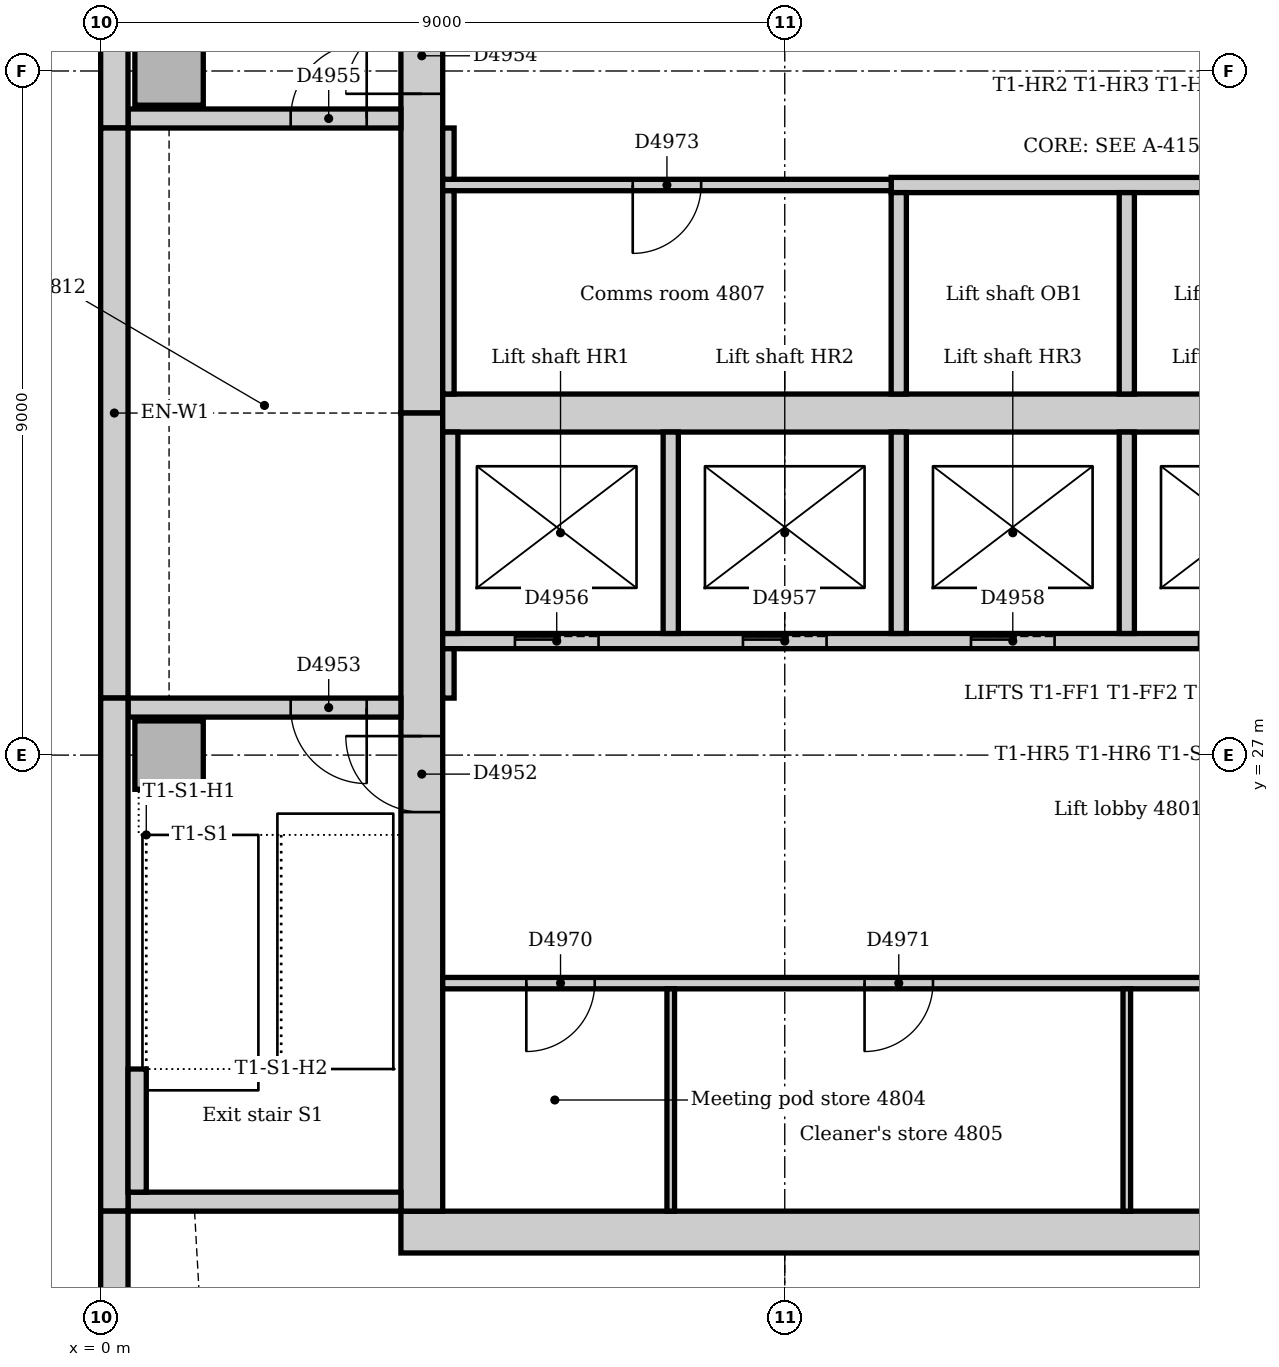
"""IFC4 building model, lengths in metres.
Left out: names, types, materials, properties, quantities, classifications, styles, units other than length and angle.
Written with IfcOpenShell. Run it as: python <this file> out.ifc"""

import sys

from ifc_helpers import new_model, si_unit, direction, frame, frame_2d, origin, origin_2d, place, context, subcontext, project, spatial, rectangle, extrude, element, fill, save


model = new_model("IFC4")
c1 = context("Model", 3, precision=1e-05, world=origin(), true_north=direction((0.0, 1.0)))
c2 = subcontext(c1, "Body", "Model", "MODEL_VIEW")
j1 = project(units=[si_unit("LENGTHUNIT", "METRE"), si_unit("PLANEANGLEUNIT", "RADIAN")], contexts=[c1])
p1 = place(None, origin())
s1 = spatial("IfcSite", under=j1, at=p1, CompositionType="ELEMENT")
p2 = place(p1, origin())
s2 = spatial("IfcBuilding", under=s1, at=p2, CompositionType="ELEMENT")
p3 = place(p2, frame((0.0, 0.0, 202.0)))
s3 = spatial("IfcBuildingStorey", under=s2, at=p3, CompositionType="ELEMENT", Elevation=202.0)
p4 = place(p3, frame((3.95, 20.725, 0.0), z_axis=(0.0, 0.0, 1.0), x_axis=(1.0, 0.0, 0.0)))
e1 = element("IfcWall", 1, at=p4, inside=s3, PredefinedType="SOLIDWALL", context=c2, shape_type="SweptSolid", body=[
    extrude(rectangle(XDim=19.1, YDim=0.55, at=frame_2d((9.55, 0.0))), origin(), (0.0, 0.0, 1.0), 4.0),
])
p5 = place(p3, frame((4.225, 42.0, 0.0), z_axis=(0.0, 0.0, 1.0), x_axis=(0.0, -1.0, 0.0)))
e2 = element("IfcWall", 2, at=p5, inside=s3, PredefinedType="SOLIDWALL", context=c2, shape_type="SweptSolid", body=[
    extrude(rectangle(XDim=10.5, YDim=0.55, at=frame_2d((5.25, 0.0))), origin(), (0.0, 0.0, 1.0), 4.0),
])
p6 = place(p5, frame((5.3, 0.0, 0.0)))
e3 = element("IfcOpeningElement", 3, at=p6, cuts=e2, PredefinedType="OPENING", context=c2, shape_type="SweptSolid", body=[
    extrude(rectangle(XDim=1.0, YDim=2.1, at=frame_2d((0.5, 1.05))), frame((0.0, 0.285, 0.0), z_axis=(0.0, -1.0, 0.0), x_axis=(1.0, 0.0, 0.0)), (0.0, 0.0, 1.0), 0.57),
])
p7 = place(p3, frame((4.225, 31.5, 0.0), z_axis=(0.0, 0.0, 1.0), x_axis=(0.0, -1.0, 0.0)))
e4 = element("IfcWall", 4, at=p7, inside=s3, PredefinedType="SOLIDWALL", context=c2, shape_type="SweptSolid", body=[
    extrude(rectangle(XDim=10.5, YDim=0.55, at=frame_2d((5.25, 0.0))), origin(), (0.0, 0.0, 1.0), 4.0),
])
p8 = place(p7, frame((4.25, 0.0, 0.0)))
e5 = element("IfcOpeningElement", 5, at=p8, cuts=e4, PredefinedType="OPENING", context=c2, shape_type="SweptSolid", body=[
    extrude(rectangle(XDim=1.0, YDim=2.1, at=frame_2d((0.5, 1.05))), frame((0.0, 0.285, 0.0), z_axis=(0.0, -1.0, 0.0), x_axis=(1.0, 0.0, 0.0)), (0.0, 0.0, 1.0), 0.57),
])
p9 = place(p3, frame((4.5, 31.5, 0.0), z_axis=(0.0, 0.0, 1.0), x_axis=(1.0, 0.0, 0.0)))
e6 = element("IfcWall", 6, at=p9, inside=s3, PredefinedType="SOLIDWALL", context=c2, shape_type="SweptSolid", body=[
    extrude(rectangle(XDim=18.0, YDim=0.5, at=frame_2d((9.0, 0.0))), origin(), (0.0, 0.0, 1.0), 4.0),
])
p10 = place(p3, frame((0.36, 21.125, 0.0), z_axis=(0.0, 0.0, 1.0), x_axis=(1.0, 0.0, 0.0)))
e7 = element("IfcWall", 7, at=p10, inside=s3, PredefinedType="SOLIDWALL", context=c2, shape_type="SweptSolid", body=[
    extrude(rectangle(XDim=3.59, YDim=0.25, at=frame_2d((1.795, 0.0))), origin(), (0.0, 0.0, 1.0), 4.0),
])
p11 = place(p3, frame((3.95, 27.625, 0.0), z_axis=(0.0, 0.0, 1.0), x_axis=(-1.0, 0.0, 0.0)))
e8 = element("IfcWall", 8, at=p11, inside=s3, PredefinedType="SOLIDWALL", context=c2, shape_type="SweptSolid", body=[
    extrude(rectangle(XDim=3.59, YDim=0.25, at=frame_2d((1.795, 0.0))), origin(), (0.0, 0.0, 1.0), 4.0),
])
p12 = place(p11, frame((0.45, 0.0, 0.0)))
e9 = element("IfcOpeningElement", 9, at=p12, cuts=e8, PredefinedType="OPENING", context=c2, shape_type="SweptSolid", body=[
    extrude(rectangle(XDim=1.0, YDim=2.1, at=frame_2d((0.5, 1.05))), frame((0.0, 0.135, 0.0), z_axis=(0.0, -1.0, 0.0), x_axis=(1.0, 0.0, 0.0)), (0.0, 0.0, 1.0), 0.27),
])
p13 = place(p3, frame((0.36, 35.375, 0.0), z_axis=(0.0, 0.0, 1.0), x_axis=(1.0, 0.0, 0.0)))
e10 = element("IfcWall", 10, at=p13, inside=s3, PredefinedType="SOLIDWALL", context=c2, shape_type="SweptSolid", body=[
    extrude(rectangle(XDim=3.59, YDim=0.25, at=frame_2d((1.795, 0.0))), origin(), (0.0, 0.0, 1.0), 4.0),
])
p14 = place(p13, frame((2.14, 0.0, 0.0)))
e11 = element("IfcOpeningElement", 11, at=p14, cuts=e10, PredefinedType="OPENING", context=c2, shape_type="SweptSolid", body=[
    extrude(rectangle(XDim=1.0, YDim=2.1, at=frame_2d((0.5, 1.05))), frame((0.0, 0.135, 0.0), z_axis=(0.0, -1.0, 0.0), x_axis=(1.0, 0.0, 0.0)), (0.0, 0.0, 1.0), 0.27),
])
for number, where, z_axis, x_axis in (
    (12, (0.9, 27.0, 0.0), (0.0, 0.0, 1.0), (1.0, 0.0, 0.0)),
    (13, (0.9, 36.0, 0.0), (0.0, 0.0, 1.0), (1.0, 0.0, 0.0)),
):
    element("IfcColumn", number, at=place(p3, frame(where, z_axis=z_axis, x_axis=x_axis)), inside=s3, PredefinedType="COLUMN", context=c2, shape_type="SweptSolid", body=[
        extrude(rectangle(XDim=0.9, YDim=0.9, at=origin_2d()), origin(), (0.0, 0.0, 1.0), 4.0),
    ])
p15 = place(p3, frame((0.18, 42.0, 0.0), z_axis=(0.0, 0.0, 1.0), x_axis=(0.0, -1.0, 0.0)))
e14 = element("IfcWall", 14, at=p15, inside=s3, PredefinedType="STANDARD", context=c2, shape_type="SweptSolid", body=[
    extrude(rectangle(XDim=6.75, YDim=0.36, at=frame_2d((3.375, 0.0))), origin(), (0.0, 0.0, 1.0), 3.85),
])
p16 = place(p3, frame((0.18, 35.25, 0.0), z_axis=(0.0, 0.0, 1.0), x_axis=(0.0, -1.0, 0.0)))
e15 = element("IfcWall", 15, at=p16, inside=s3, PredefinedType="STANDARD", context=c2, shape_type="SweptSolid", body=[
    extrude(rectangle(XDim=7.5, YDim=0.36, at=frame_2d((3.75, 0.0))), origin(), (0.0, 0.0, 1.0), 3.85),
])
p17 = place(p3, frame((0.18, 27.75, 0.0), z_axis=(0.0, 0.0, 1.0), x_axis=(0.0, -1.0, 0.0)))
e16 = element("IfcWall", 16, at=p17, inside=s3, PredefinedType="STANDARD", context=c2, shape_type="SweptSolid", body=[
    extrude(rectangle(XDim=6.75, YDim=0.36, at=frame_2d((3.375, 0.0))), origin(), (0.0, 0.0, 1.0), 3.85),
])
p18 = place(p3, frame((0.18, 21.0, 0.0), z_axis=(0.0, 0.0, 1.0), x_axis=(0.0, -1.0, 0.0)))
e17 = element("IfcWall", 17, at=p18, inside=s3, PredefinedType="STANDARD", context=c2, shape_type="SweptSolid", body=[
    extrude(rectangle(XDim=3.257, YDim=0.36, at=frame_2d((1.629, 0.0))), origin(), (0.0, 0.0, 1.0), 3.85),
])
p19 = place(p3, frame((0.48, 21.25, 0.0), z_axis=(0.0, 0.0, 1.0), x_axis=(0.0, 1.0, 0.0)))
e18 = element("IfcWall", 18, at=p19, inside=s3, PredefinedType="STANDARD", context=c2, shape_type="SweptSolid", body=[
    extrude(rectangle(XDim=1.62, YDim=0.24, at=frame_2d((0.81, 0.0))), origin(), (0.0, 0.0, 1.0), 4.0),
])
p20 = place(p3, frame((4.5, 28.5, 0.0), z_axis=(0.0, 0.0, 1.0), x_axis=(1.0, 0.0, 0.0)))
e19 = element("IfcWall", 19, at=p20, inside=s3, PredefinedType="PARTITIONING", context=c2, shape_type="SweptSolid", body=[
    extrude(rectangle(XDim=18.0, YDim=0.2, at=frame_2d((9.0, 0.0))), origin(), (0.0, 0.0, 1.0), 3.85),
])
p21 = place(p20, frame((0.95, 0.0, 0.0)))
e20 = element("IfcOpeningElement", 20, at=p21, cuts=e19, PredefinedType="OPENING", context=c2, shape_type="SweptSolid", body=[
    extrude(rectangle(XDim=1.1, YDim=2.1, at=frame_2d((0.55, 1.05))), frame((0.0, 0.11, 0.0), z_axis=(0.0, -1.0, 0.0), x_axis=(1.0, 0.0, 0.0)), (0.0, 0.0, 1.0), 0.22),
])
p22 = place(p20, frame((3.95, 0.0, 0.0)))
e21 = element("IfcOpeningElement", 21, at=p22, cuts=e19, PredefinedType="OPENING", context=c2, shape_type="SweptSolid", body=[
    extrude(rectangle(XDim=1.1, YDim=2.1, at=frame_2d((0.55, 1.05))), frame((0.0, 0.11, 0.0), z_axis=(0.0, -1.0, 0.0), x_axis=(1.0, 0.0, 0.0)), (0.0, 0.0, 1.0), 0.22),
])
p23 = place(p20, frame((6.95, 0.0, 0.0)))
e22 = element("IfcOpeningElement", 22, at=p23, cuts=e19, PredefinedType="OPENING", context=c2, shape_type="SweptSolid", body=[
    extrude(rectangle(XDim=1.1, YDim=2.1, at=frame_2d((0.55, 1.05))), frame((0.0, 0.11, 0.0), z_axis=(0.0, -1.0, 0.0), x_axis=(1.0, 0.0, 0.0)), (0.0, 0.0, 1.0), 0.22),
])
p24 = place(p20, frame((9.95, 0.0, 0.0)))
e23 = element("IfcOpeningElement", 23, at=p24, cuts=e19, PredefinedType="OPENING", context=c2, shape_type="SweptSolid", body=[
    extrude(rectangle(XDim=1.1, YDim=2.1, at=frame_2d((0.55, 1.05))), frame((0.0, 0.11, 0.0), z_axis=(0.0, -1.0, 0.0), x_axis=(1.0, 0.0, 0.0)), (0.0, 0.0, 1.0), 0.22),
])
p25 = place(p20, frame((12.95, 0.0, 0.0)))
e24 = element("IfcOpeningElement", 24, at=p25, cuts=e19, PredefinedType="OPENING", context=c2, shape_type="SweptSolid", body=[
    extrude(rectangle(XDim=1.1, YDim=2.1, at=frame_2d((0.55, 1.05))), frame((0.0, 0.11, 0.0), z_axis=(0.0, -1.0, 0.0), x_axis=(1.0, 0.0, 0.0)), (0.0, 0.0, 1.0), 0.22),
])
p26 = place(p20, frame((15.95, 0.0, 0.0)))
e25 = element("IfcOpeningElement", 25, at=p26, cuts=e19, PredefinedType="OPENING", context=c2, shape_type="SweptSolid", body=[
    extrude(rectangle(XDim=1.1, YDim=2.1, at=frame_2d((0.55, 1.05))), frame((0.0, 0.11, 0.0), z_axis=(0.0, -1.0, 0.0), x_axis=(1.0, 0.0, 0.0)), (0.0, 0.0, 1.0), 0.22),
])
p27 = place(p3, frame((10.4, 34.5, 0.0), z_axis=(0.0, 0.0, 1.0), x_axis=(1.0, 0.0, 0.0)))
e26 = element("IfcWall", 26, at=p27, inside=s3, PredefinedType="PARTITIONING", context=c2, shape_type="SweptSolid", body=[
    extrude(rectangle(XDim=12.1, YDim=0.2, at=frame_2d((6.05, 0.0))), origin(), (0.0, 0.0, 1.0), 3.85),
])
p28 = place(p27, frame((7.05, 0.0, 0.0)))
e27 = element("IfcOpeningElement", 27, at=p28, cuts=e26, PredefinedType="OPENING", context=c2, shape_type="SweptSolid", body=[
    extrude(rectangle(XDim=1.1, YDim=2.1, at=frame_2d((0.55, 1.05))), frame((0.0, 0.11, 0.0), z_axis=(0.0, -1.0, 0.0), x_axis=(1.0, 0.0, 0.0)), (0.0, 0.0, 1.0), 0.22),
])
p29 = place(p27, frame((10.05, 0.0, 0.0)))
e28 = element("IfcOpeningElement", 28, at=p29, cuts=e26, PredefinedType="OPENING", context=c2, shape_type="SweptSolid", body=[
    extrude(rectangle(XDim=1.1, YDim=2.1, at=frame_2d((0.55, 1.05))), frame((0.0, 0.11, 0.0), z_axis=(0.0, -1.0, 0.0), x_axis=(1.0, 0.0, 0.0)), (0.0, 0.0, 1.0), 0.22),
])
for number, where, z_axis, x_axis in (
    (29, (10.5, 28.6, 0.0), (0.0, 0.0, 1.0), (0.0, 1.0, 0.0)),
    (30, (10.5, 31.75, 0.0), (0.0, 0.0, 1.0), (0.0, 1.0, 0.0)),
    (31, (13.5, 28.6, 0.0), (0.0, 0.0, 1.0), (0.0, 1.0, 0.0)),
    (32, (13.5, 31.75, 0.0), (0.0, 0.0, 1.0), (0.0, 1.0, 0.0)),
    (33, (4.6, 28.6, 0.0), (0.0, 0.0, 1.0), (0.0, 1.0, 0.0)),
    (34, (7.5, 28.6, 0.0), (0.0, 0.0, 1.0), (0.0, 1.0, 0.0)),
):
    element("IfcWall", number, at=place(p3, frame(where, z_axis=z_axis, x_axis=x_axis)), inside=s3, PredefinedType="PARTITIONING", context=c2, shape_type="SweptSolid", body=[
        extrude(rectangle(XDim=2.65, YDim=0.2, at=frame_2d((1.325, 0.0))), origin(), (0.0, 0.0, 1.0), 3.85),
    ])
p30 = place(p3, frame((4.5, 24.0, 0.0), z_axis=(0.0, 0.0, 1.0), x_axis=(1.0, 0.0, 0.0)))
e35 = element("IfcWall", 35, at=p30, inside=s3, PredefinedType="PARTITIONING", context=c2, shape_type="SweptSolid", body=[
    extrude(rectangle(XDim=18.0, YDim=0.15, at=frame_2d((9.0, 0.0))), origin(), (0.0, 0.0, 1.0), 3.85),
])
p31 = place(p30, frame((1.1, 0.0, 0.0)))
e36 = element("IfcOpeningElement", 36, at=p31, cuts=e35, PredefinedType="OPENING", context=c2, shape_type="SweptSolid", body=[
    extrude(rectangle(XDim=0.9, YDim=2.1, at=frame_2d((0.45, 1.05))), frame((0.0, 0.085, 0.0), z_axis=(0.0, -1.0, 0.0), x_axis=(1.0, 0.0, 0.0)), (0.0, 0.0, 1.0), 0.17),
])
p32 = place(p30, frame((5.55, 0.0, 0.0)))
e37 = element("IfcOpeningElement", 37, at=p32, cuts=e35, PredefinedType="OPENING", context=c2, shape_type="SweptSolid", body=[
    extrude(rectangle(XDim=0.9, YDim=2.1, at=frame_2d((0.45, 1.05))), frame((0.0, 0.085, 0.0), z_axis=(0.0, -1.0, 0.0), x_axis=(1.0, 0.0, 0.0)), (0.0, 0.0, 1.0), 0.17),
])
p33 = place(p30, frame((12.95, 0.0, 0.0)))
e38 = element("IfcOpeningElement", 38, at=p33, cuts=e35, PredefinedType="OPENING", context=c2, shape_type="SweptSolid", body=[
    extrude(rectangle(XDim=0.9, YDim=2.1, at=frame_2d((0.45, 1.05))), frame((0.0, 0.085, 0.0), z_axis=(0.0, -1.0, 0.0), x_axis=(1.0, 0.0, 0.0)), (0.0, 0.0, 1.0), 0.17),
])
p34 = place(p3, frame((4.5, 34.5, 0.0), z_axis=(0.0, 0.0, 1.0), x_axis=(1.0, 0.0, 0.0)))
e39 = element("IfcWall", 39, at=p34, inside=s3, PredefinedType="PARTITIONING", context=c2, shape_type="SweptSolid", body=[
    extrude(rectangle(XDim=5.9, YDim=0.15, at=frame_2d((2.95, 0.0))), origin(), (0.0, 0.0, 1.0), 3.85),
])
p35 = place(p34, frame((2.5, 0.0, 0.0)))
e40 = element("IfcOpeningElement", 40, at=p35, cuts=e39, PredefinedType="OPENING", context=c2, shape_type="SweptSolid", body=[
    extrude(rectangle(XDim=0.9, YDim=2.1, at=frame_2d((0.45, 1.05))), frame((0.0, 0.085, 0.0), z_axis=(0.0, -1.0, 0.0), x_axis=(1.0, 0.0, 0.0)), (0.0, 0.0, 1.0), 0.17),
])
p36 = place(p3, frame((4.575, 34.575, 0.0), z_axis=(0.0, 0.0, 1.0), x_axis=(0.0, 1.0, 0.0)))
e41 = element("IfcWall", 41, at=p36, inside=s3, PredefinedType="PARTITIONING", context=c2, shape_type="SweptSolid", body=[
    extrude(rectangle(XDim=0.675, YDim=0.15, at=frame_2d((0.338, 0.0))), origin(), (0.0, 0.0, 1.0), 3.85),
])
p37 = place(p3, frame((4.575, 31.75, 0.0), z_axis=(0.0, 0.0, 1.0), x_axis=(0.0, 1.0, 0.0)))
e42 = element("IfcWall", 42, at=p37, inside=s3, PredefinedType="PARTITIONING", context=c2, shape_type="SweptSolid", body=[
    extrude(rectangle(XDim=2.675, YDim=0.15, at=frame_2d((1.337, 0.0))), origin(), (0.0, 0.0, 1.0), 3.85),
])
p38 = place(p3, frame((4.575, 27.75, 0.0), z_axis=(0.0, 0.0, 1.0), x_axis=(0.0, 1.0, 0.0)))
e43 = element("IfcWall", 43, at=p38, inside=s3, PredefinedType="PARTITIONING", context=c2, shape_type="SweptSolid", body=[
    extrude(rectangle(XDim=0.65, YDim=0.15, at=frame_2d((0.325, 0.0))), origin(), (0.0, 0.0, 1.0), 3.85),
])
for number, where, z_axis, x_axis in (
    (44, (7.5, 21.0, 0.0), (0.0, 0.0, 1.0), (0.0, 1.0, 0.0)),
    (45, (13.5, 21.0, 0.0), (0.0, 0.0, 1.0), (0.0, 1.0, 0.0)),
):
    element("IfcWall", number, at=place(p3, frame(where, z_axis=z_axis, x_axis=x_axis)), inside=s3, PredefinedType="PARTITIONING", context=c2, shape_type="SweptSolid", body=[
        extrude(rectangle(XDim=2.925, YDim=0.1, at=frame_2d((1.462, 0.0))), origin(), (0.0, 0.0, 1.0), 3.85),
    ])
p39 = place(p8, frame((1.0, 0.0, 0.0), z_axis=(0.0, 0.0, 1.0), x_axis=(-1.0, 0.0, 0.0)))
e46 = element("IfcDoor", 46, at=p39, inside=s3, OperationType="SINGLE_SWING_RIGHT", PredefinedType="DOOR", context=c2, shape_type="SweptSolid", body=[
    extrude(rectangle(XDim=1.0, YDim=2.1, at=frame_2d((0.5, 1.05))), frame((0.0, 0.025, 0.0), z_axis=(0.0, -1.0, 0.0), x_axis=(1.0, 0.0, 0.0)), (0.0, 0.0, 1.0), 0.05),
])
fill(e5, e46)
p40 = place(p12, origin())
e47 = element("IfcDoor", 47, at=p40, inside=s3, OperationType="SINGLE_SWING_LEFT", PredefinedType="DOOR", context=c2, shape_type="SweptSolid", body=[
    extrude(rectangle(XDim=1.0, YDim=2.1, at=frame_2d((0.5, 1.05))), frame((0.0, 0.025, 0.0), z_axis=(0.0, -1.0, 0.0), x_axis=(1.0, 0.0, 0.0)), (0.0, 0.0, 1.0), 0.05),
])
fill(e9, e47)
p41 = place(p6, frame((1.0, 0.0, 0.0), z_axis=(0.0, 0.0, 1.0), x_axis=(-1.0, 0.0, 0.0)))
e48 = element("IfcDoor", 48, at=p41, inside=s3, OperationType="SINGLE_SWING_LEFT", PredefinedType="DOOR", context=c2, shape_type="SweptSolid", body=[
    extrude(rectangle(XDim=1.0, YDim=2.1, at=frame_2d((0.5, 1.05))), frame((0.0, 0.025, 0.0), z_axis=(0.0, -1.0, 0.0), x_axis=(1.0, 0.0, 0.0)), (0.0, 0.0, 1.0), 0.05),
])
fill(e3, e48)
p42 = place(p14, origin())
e49 = element("IfcDoor", 49, at=p42, inside=s3, OperationType="SINGLE_SWING_RIGHT", PredefinedType="DOOR", context=c2, shape_type="SweptSolid", body=[
    extrude(rectangle(XDim=1.0, YDim=2.1, at=frame_2d((0.5, 1.05))), frame((0.0, 0.025, 0.0), z_axis=(0.0, -1.0, 0.0), x_axis=(1.0, 0.0, 0.0)), (0.0, 0.0, 1.0), 0.05),
])
fill(e11, e49)
p43 = place(p21, origin())
e50 = element("IfcDoor", 50, at=p43, inside=s3, OperationType="SLIDING_TO_LEFT", PredefinedType="DOOR", context=c2, shape_type="SweptSolid", body=[
    extrude(rectangle(XDim=1.1, YDim=2.1, at=frame_2d((0.55, 1.05))), frame((0.0, 0.025, 0.0), z_axis=(0.0, -1.0, 0.0), x_axis=(1.0, 0.0, 0.0)), (0.0, 0.0, 1.0), 0.05),
])
fill(e20, e50)
p44 = place(p22, origin())
e51 = element("IfcDoor", 51, at=p44, inside=s3, OperationType="SLIDING_TO_LEFT", PredefinedType="DOOR", context=c2, shape_type="SweptSolid", body=[
    extrude(rectangle(XDim=1.1, YDim=2.1, at=frame_2d((0.55, 1.05))), frame((0.0, 0.025, 0.0), z_axis=(0.0, -1.0, 0.0), x_axis=(1.0, 0.0, 0.0)), (0.0, 0.0, 1.0), 0.05),
])
fill(e21, e51)
p45 = place(p23, origin())
e52 = element("IfcDoor", 52, at=p45, inside=s3, OperationType="SLIDING_TO_LEFT", PredefinedType="DOOR", context=c2, shape_type="SweptSolid", body=[
    extrude(rectangle(XDim=1.1, YDim=2.1, at=frame_2d((0.55, 1.05))), frame((0.0, 0.025, 0.0), z_axis=(0.0, -1.0, 0.0), x_axis=(1.0, 0.0, 0.0)), (0.0, 0.0, 1.0), 0.05),
])
fill(e22, e52)
p46 = place(p31, frame((0.9, 0.0, 0.0), z_axis=(0.0, 0.0, 1.0), x_axis=(-1.0, 0.0, 0.0)))
e53 = element("IfcDoor", 53, at=p46, inside=s3, OperationType="SINGLE_SWING_RIGHT", PredefinedType="DOOR", context=c2, shape_type="SweptSolid", body=[
    extrude(rectangle(XDim=0.9, YDim=2.1, at=frame_2d((0.45, 1.05))), frame((0.0, 0.025, 0.0), z_axis=(0.0, -1.0, 0.0), x_axis=(1.0, 0.0, 0.0)), (0.0, 0.0, 1.0), 0.05),
])
fill(e36, e53)
p47 = place(p32, frame((0.9, 0.0, 0.0), z_axis=(0.0, 0.0, 1.0), x_axis=(-1.0, 0.0, 0.0)))
e54 = element("IfcDoor", 54, at=p47, inside=s3, OperationType="SINGLE_SWING_RIGHT", PredefinedType="DOOR", context=c2, shape_type="SweptSolid", body=[
    extrude(rectangle(XDim=0.9, YDim=2.1, at=frame_2d((0.45, 1.05))), frame((0.0, 0.025, 0.0), z_axis=(0.0, -1.0, 0.0), x_axis=(1.0, 0.0, 0.0)), (0.0, 0.0, 1.0), 0.05),
])
fill(e37, e54)
p48 = place(p35, frame((0.9, 0.0, 0.0), z_axis=(0.0, 0.0, 1.0), x_axis=(-1.0, 0.0, 0.0)))
e55 = element("IfcDoor", 55, at=p48, inside=s3, OperationType="SINGLE_SWING_RIGHT", PredefinedType="DOOR", context=c2, shape_type="SweptSolid", body=[
    extrude(rectangle(XDim=0.9, YDim=2.1, at=frame_2d((0.45, 1.05))), frame((0.0, 0.025, 0.0), z_axis=(0.0, -1.0, 0.0), x_axis=(1.0, 0.0, 0.0)), (0.0, 0.0, 1.0), 0.05),
])
fill(e40, e55)
save(model, sys.argv[1])
